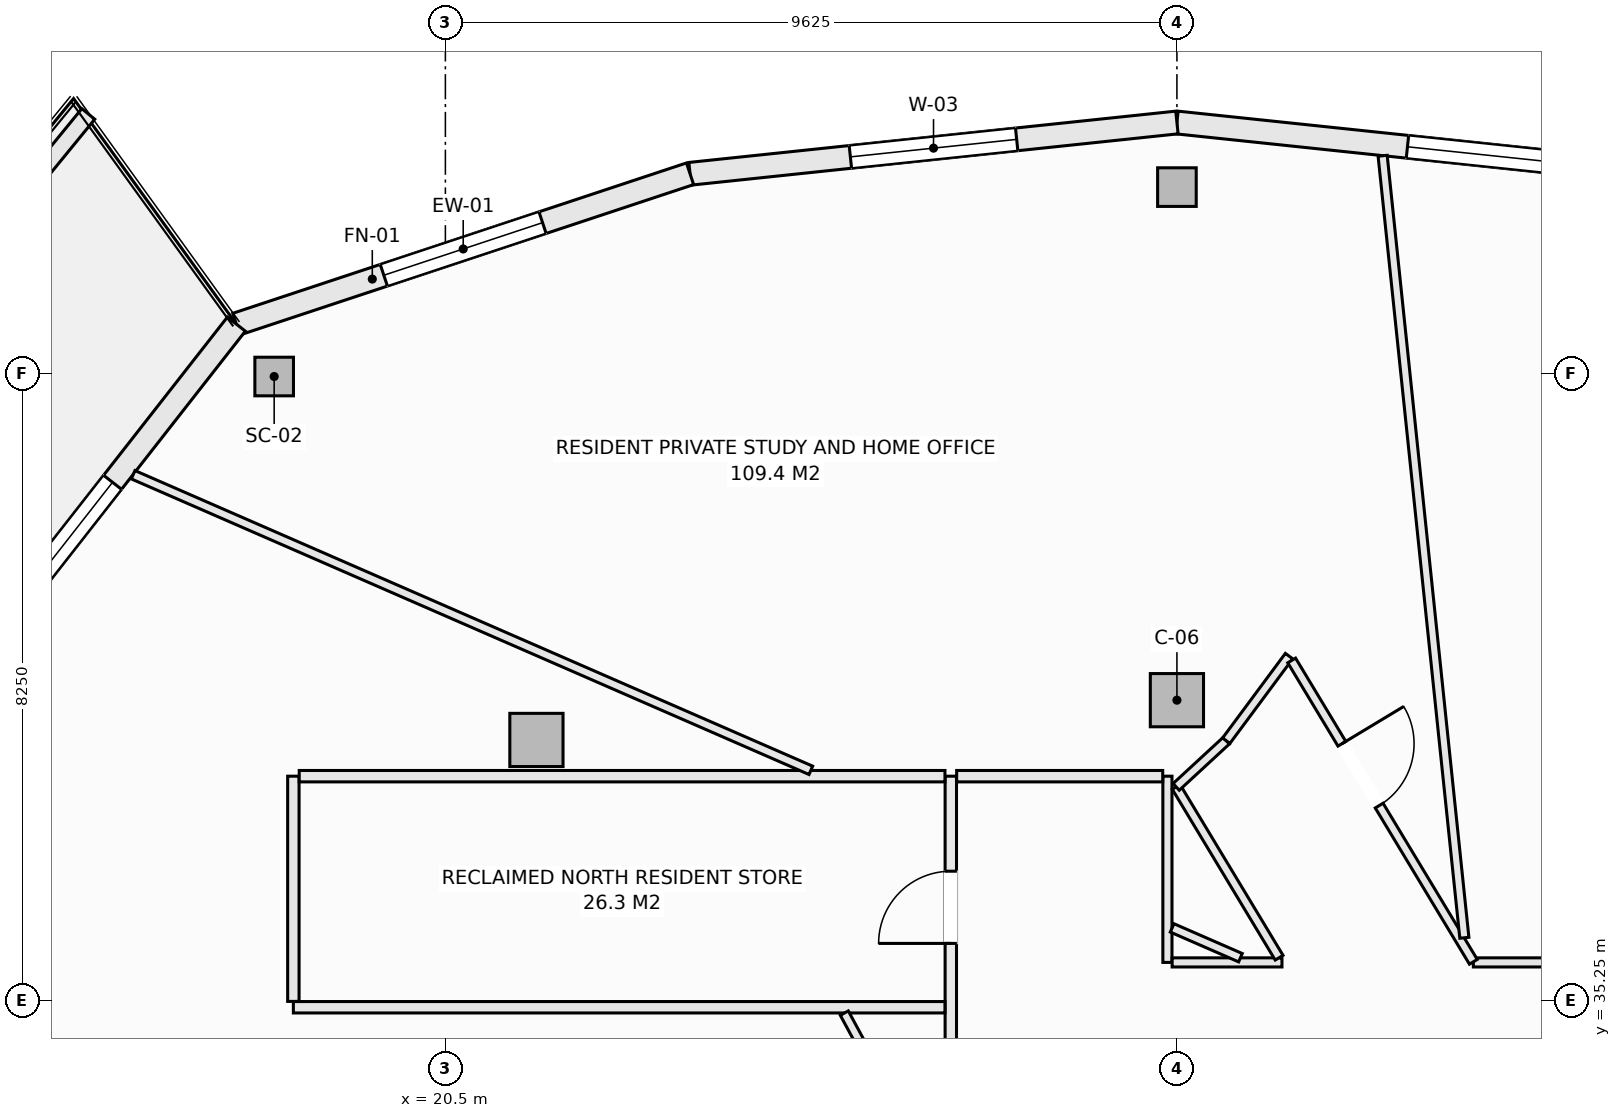
"""IFC4 building model, lengths in metres.
Left out: names, types, materials, properties, quantities, classifications, styles, units other than length and angle.
Written with IfcOpenShell. Run it as: python <this file> out.ifc"""

import sys

from ifc_helpers import new_model, si_unit, direction, frame, frame_2d, origin, origin_2d, place, context, subcontext, project, spatial, rectangle, hollow_rectangle, extrude, element, fill, save


model = new_model("IFC4")
c1 = context("Model", 3, precision=1e-05, world=origin(), true_north=direction((0.0, 1.0)))
c2 = subcontext(c1, "Body", "Model", "MODEL_VIEW")
j1 = project(units=[si_unit("LENGTHUNIT", "METRE"), si_unit("PLANEANGLEUNIT", "RADIAN")], contexts=[c1])
p1 = place(None, origin())
s1 = spatial("IfcSite", under=j1, at=p1, CompositionType="ELEMENT")
p2 = place(p1, origin())
s2 = spatial("IfcBuilding", under=s1, at=p2, CompositionType="ELEMENT")
p3 = place(p2, frame((0.0, 0.0, 232.7)))
s3 = spatial("IfcBuildingStorey", under=s2, at=p3, CompositionType="ELEMENT", Elevation=232.7)
for number, where, z_axis, x_axis in (
    (1, (30.125, 45.95, -0.27), (0.0, 0.0, 1.0), (1.0, 0.0, 0.0)),
    (2, (18.247, 43.458, -0.27), (0.0, 0.0, 1.0), (1.0, 0.0, 0.0)),
):
    element("IfcColumn", number, at=place(p3, frame(where, z_axis=z_axis, x_axis=x_axis)), inside=s3, PredefinedType="COLUMN", context=c2, shape_type="SweptSolid", body=[
        extrude(hollow_rectangle(XDim=0.508, YDim=0.508, WallThickness=0.019, at=origin_2d()), origin(), (0.0, 0.0, 1.0), 3.3),
    ])
for number, where, z_axis, x_axis in (
    (3, (30.125, 39.2, -0.27), (0.0, 0.0, 1.0), (1.0, 0.0, 0.0)),
    (4, (21.698, 38.677, -0.27), (0.0, 0.0, 1.0), (1.0, 0.0, 0.0)),
):
    element("IfcColumn", number, at=place(p3, frame(where, z_axis=z_axis, x_axis=x_axis)), inside=s3, PredefinedType="COLUMN", context=c2, shape_type="SweptSolid", body=[
        extrude(rectangle(XDim=0.7, YDim=0.7, at=origin_2d()), origin(), (0.0, 0.0, 1.0), 3.3),
    ])
p4 = place(p3, frame((30.125, 46.8, 0.0), z_axis=(0.0, 0.0, 1.0), x_axis=(0.994497142298, -0.104763705363, 0.0)))
e5 = element("IfcWall", 5, at=p4, inside=s3, PredefinedType="SOLIDWALL", context=c2, shape_type="SweptSolid", body=[
    extrude(rectangle(XDim=6.441, YDim=0.3, at=frame_2d((3.221, 0.0))), origin(), (0.0, 0.0, 1.0), 2.605),
])
p5 = place(p4, frame((3.05, 0.0, 0.72)))
e6 = element("IfcOpeningElement", 6, at=p5, cuts=e5, PredefinedType="OPENING", context=c2, shape_type="SweptSolid", body=[
    extrude(rectangle(XDim=2.2, YDim=1.65, at=frame_2d((1.1, 0.825))), frame((0.0, 0.16, 0.0), z_axis=(0.0, -1.0, 0.0), x_axis=(1.0, 0.0, 0.0)), (0.0, 0.0, 1.0), 0.32),
])
p6 = place(p3, frame((23.719, 46.125, 0.0), z_axis=(0.0, 0.0, 1.0), x_axis=(0.994497142298, 0.104763705363, 0.0)))
e7 = element("IfcWall", 7, at=p6, inside=s3, PredefinedType="SOLIDWALL", context=c2, shape_type="SweptSolid", body=[
    extrude(rectangle(XDim=6.441, YDim=0.3, at=frame_2d((3.221, 0.0))), origin(), (0.0, 0.0, 1.0), 2.605),
])
p7 = place(p6, frame((2.121, 0.0, 0.72)))
e8 = element("IfcOpeningElement", 8, at=p7, cuts=e7, PredefinedType="OPENING", context=c2, shape_type="SweptSolid", body=[
    extrude(rectangle(XDim=2.2, YDim=1.65, at=frame_2d((1.1, 0.825))), frame((0.0, 0.16, 0.0), z_axis=(0.0, -1.0, 0.0), x_axis=(1.0, 0.0, 0.0)), (0.0, 0.0, 1.0), 0.32),
])
p8 = place(p3, frame((17.75, 44.147, 0.0), z_axis=(0.0, 0.0, 1.0), x_axis=(0.949240877604, 0.314550085495, 0.0)))
e9 = element("IfcWall", 9, at=p8, inside=s3, PredefinedType="SOLIDWALL", context=c2, shape_type="SweptSolid", body=[
    extrude(rectangle(XDim=6.288, YDim=0.3, at=frame_2d((3.144, 0.0))), origin(), (0.0, 0.0, 1.0), 2.605),
])
p9 = place(p8, frame((2.044, 0.0, 0.72)))
e10 = element("IfcOpeningElement", 10, at=p9, cuts=e9, PredefinedType="OPENING", context=c2, shape_type="SweptSolid", body=[
    extrude(rectangle(XDim=2.2, YDim=1.65, at=frame_2d((1.1, 0.825))), frame((0.0, 0.16, 0.0), z_axis=(0.0, -1.0, 0.0), x_axis=(1.0, 0.0, 0.0)), (0.0, 0.0, 1.0), 0.32),
])
p10 = place(p3, frame((14.117, 39.507, 0.0), z_axis=(0.0, 0.0, 1.0), x_axis=(0.616450126935, 0.787393955401, 0.0)))
e11 = element("IfcWall", 11, at=p10, inside=s3, PredefinedType="SOLIDWALL", context=c2, shape_type="SweptSolid", body=[
    extrude(rectangle(XDim=5.893, YDim=0.3, at=frame_2d((2.946, 0.0))), origin(), (0.0, 0.0, 1.0), 2.605),
])
p11 = place(p10, frame((1.05, 0.0, 0.72)))
e12 = element("IfcOpeningElement", 12, at=p11, cuts=e11, PredefinedType="OPENING", context=c2, shape_type="SweptSolid", body=[
    extrude(rectangle(XDim=2.2, YDim=1.65, at=frame_2d((1.1, 0.825))), frame((0.0, 0.16, 0.0), z_axis=(0.0, -1.0, 0.0), x_axis=(1.0, 0.0, 0.0)), (0.0, 0.0, 1.0), 0.32),
])
p12 = place(p3, frame((11.427, 41.559, 0.0), z_axis=(0.0, 0.0, 1.0), x_axis=(0.632697312147, 0.774399193699, 0.0)))
e13 = element("IfcWall", 13, at=p12, inside=s3, PredefinedType="PARAPET", context=c2, shape_type="SweptSolid", body=[
    extrude(rectangle(XDim=6.914, YDim=0.22, at=frame_2d((3.457, 0.0))), origin(), (0.0, 0.0, 1.0), 0.52),
])
p13 = place(p3, frame((27.15, 34.002, 0.0), z_axis=(0.0, 0.0, 1.0), x_axis=(0.0, 1.0, 0.0)))
e14 = element("IfcWall", 14, at=p13, inside=s3, PredefinedType="PARTITIONING", context=c2, shape_type="SweptSolid", body=[
    extrude(rectangle(XDim=4.198, YDim=0.15, at=frame_2d((2.099, 0.0))), origin(), (0.0, 0.0, 1.0), 3.03),
])
p14 = place(p13, frame((1.998, 0.0, 0.0)))
e15 = element("IfcOpeningElement", 15, at=p14, cuts=e14, PredefinedType="OPENING", context=c2, shape_type="SweptSolid", body=[
    extrude(rectangle(XDim=0.95, YDim=2.1, at=frame_2d((0.475, 1.05))), frame((0.0, 0.085, 0.0), z_axis=(0.0, -1.0, 0.0), x_axis=(1.0, 0.0, 0.0)), (0.0, 0.0, 1.0), 0.17),
])
p15 = place(p3, frame((30.0, 35.75, 0.0), z_axis=(0.0, 0.0, 1.0), x_axis=(0.0, 1.0, 0.0)))
e16 = element("IfcWall", 16, at=p15, inside=s3, PredefinedType="PARTITIONING", context=c2, shape_type="SweptSolid", body=[
    extrude(rectangle(XDim=2.45, YDim=0.12, at=frame_2d((1.225, 0.0))), origin(), (0.0, 0.0, 1.0), 3.03),
])
p16 = place(p3, frame((18.5, 35.16, 0.0), z_axis=(0.0, 0.0, 1.0), x_axis=(1.0, 0.0, 0.0)))
e17 = element("IfcWall", 17, at=p16, inside=s3, PredefinedType="PARTITIONING", context=c2, shape_type="SweptSolid", body=[
    extrude(rectangle(XDim=8.573, YDim=0.15, at=frame_2d((4.287, 0.0))), origin(), (0.0, 0.0, 1.0), 3.03),
])
p17 = place(p3, frame((18.5, 35.237, 0.0), z_axis=(0.0, 0.0, 1.0), x_axis=(0.0, 1.0, 0.0)))
e18 = element("IfcWall", 18, at=p17, inside=s3, PredefinedType="PARTITIONING", context=c2, shape_type="SweptSolid", body=[
    extrude(rectangle(XDim=2.963, YDim=0.15, at=frame_2d((1.481, 0.0))), origin(), (0.0, 0.0, 1.0), 3.03),
])
p18 = place(p3, frame((18.577, 38.2, 0.0), z_axis=(0.0, 0.0, 1.0), x_axis=(1.0, 0.0, 0.0)))
e19 = element("IfcWall", 19, at=p18, inside=s3, PredefinedType="PARTITIONING", context=c2, shape_type="SweptSolid", body=[
    extrude(rectangle(XDim=8.496, YDim=0.15, at=frame_2d((4.248, 0.0))), origin(), (0.0, 0.0, 1.0), 3.03),
])
p19 = place(p3, frame((27.227, 38.2, 0.0), z_axis=(0.0, 0.0, 1.0), x_axis=(1.0, 0.0, 0.0)))
e20 = element("IfcWall", 20, at=p19, inside=s3, PredefinedType="PARTITIONING", context=c2, shape_type="SweptSolid", body=[
    extrude(rectangle(XDim=2.711, YDim=0.15, at=frame_2d((1.355, 0.0))), origin(), (0.0, 0.0, 1.0), 3.03),
])
p20 = place(p3, frame((30.062, 35.75, 0.0), z_axis=(0.0, 0.0, 1.0), x_axis=(1.0, 0.0, 0.0)))
e21 = element("IfcWall", 21, at=p20, inside=s3, PredefinedType="PARTITIONING", context=c2, shape_type="SweptSolid", body=[
    extrude(rectangle(XDim=1.445, YDim=0.12, at=frame_2d((0.723, 0.0))), origin(), (0.0, 0.0, 1.0), 3.03),
])
p21 = place(p3, frame((34.025, 35.75, 0.0), z_axis=(0.0, 0.0, 1.0), x_axis=(1.0, 0.0, 0.0)))
e22 = element("IfcWall", 22, at=p21, inside=s3, PredefinedType="PARTITIONING", context=c2, shape_type="SweptSolid", body=[
    extrude(rectangle(XDim=5.025, YDim=0.12, at=frame_2d((2.513, 0.0))), origin(), (0.0, 0.0, 1.0), 2.478),
])
p22 = place(p21, frame((1.617, 0.0, 0.0)))
e23 = element("IfcOpeningElement", 23, at=p22, cuts=e22, PredefinedType="OPENING", context=c2, shape_type="SweptSolid", body=[
    extrude(rectangle(XDim=0.95, YDim=2.1, at=frame_2d((0.475, 1.05))), frame((0.0, 0.07, 0.0), z_axis=(0.0, -1.0, 0.0), x_axis=(1.0, 0.0, 0.0)), (0.0, 0.0, 1.0), 0.14),
])
p23 = place(p3, frame((30.115, 38.059, 0.0), z_axis=(0.0, 0.0, 1.0), x_axis=(0.516246227887, -0.85644020935, 0.0)))
e24 = element("IfcWall", 24, at=p23, inside=s3, PredefinedType="PARTITIONING", context=c2, shape_type="SweptSolid", body=[
    extrude(rectangle(XDim=2.624, YDim=0.12, at=frame_2d((1.312, 0.0))), origin(), (0.0, 0.0, 1.0), 3.03),
])
p24 = place(p3, frame((30.115, 38.059, 0.0), z_axis=(0.0, 0.0, 1.0), x_axis=(0.734991343239, 0.678076489316, 0.0)))
e25 = element("IfcWall", 25, at=p24, inside=s3, PredefinedType="PARTITIONING", context=c2, shape_type="SweptSolid", body=[
    extrude(rectangle(XDim=0.896, YDim=0.12, at=frame_2d((0.448, 0.0))), origin(), (0.0, 0.0, 1.0), 3.03),
])
p25 = place(p3, frame((30.774, 38.667, 0.0), z_axis=(0.0, 0.0, 1.0), x_axis=(0.596019138224, 0.802970227885, 0.0)))
e26 = element("IfcWall", 26, at=p25, inside=s3, PredefinedType="PARTITIONING", context=c2, shape_type="SweptSolid", body=[
    extrude(rectangle(XDim=1.386, YDim=0.12, at=frame_2d((0.693, 0.0))), origin(), (0.0, 0.0, 1.0), 3.03),
])
p26 = place(p3, frame((31.635, 39.723, 0.0), z_axis=(0.0, 0.0, 1.0), x_axis=(0.516340331217, -0.856383478565, 0.0)))
e27 = element("IfcWall", 27, at=p26, inside=s3, PredefinedType="PARTITIONING", context=c2, shape_type="SweptSolid", body=[
    extrude(rectangle(XDim=4.629, YDim=0.12, at=frame_2d((2.315, 0.0))), origin(), (0.0, 0.0, 1.0), 3.03),
])
p27 = place(p26, frame((1.28, 0.0, 0.0)))
e28 = element("IfcOpeningElement", 28, at=p27, cuts=e27, PredefinedType="OPENING", context=c2, shape_type="SweptSolid", body=[
    extrude(rectangle(XDim=0.95, YDim=2.1, at=frame_2d((0.475, 1.05))), frame((0.0, 0.07, 0.0), z_axis=(0.0, -1.0, 0.0), x_axis=(1.0, 0.0, 0.0)), (0.0, 0.0, 1.0), 0.14),
])
p28 = place(p3, frame((16.392, 42.166, 0.0), z_axis=(0.0, 0.0, 1.0), x_axis=(0.916624998673, -0.399748185496, 0.0)))
e29 = element("IfcWall", 29, at=p28, inside=s3, PredefinedType="PARTITIONING", context=c2, shape_type="SweptSolid", body=[
    extrude(rectangle(XDim=9.728, YDim=0.12, at=frame_2d((4.864, 0.0))), origin(), (0.0, 0.0, 1.0), 2.478),
])
p29 = place(p3, frame((30.062, 36.204, 0.0), z_axis=(0.0, 0.0, 1.0), x_axis=(0.916602414635, -0.39979996684, 0.0)))
e30 = element("IfcWall", 30, at=p29, inside=s3, PredefinedType="PARTITIONING", context=c2, shape_type="SweptSolid", body=[
    extrude(rectangle(XDim=0.981, YDim=0.12, at=frame_2d((0.49, 0.0))), origin(), (0.0, 0.0, 1.0), 3.03),
])
p30 = place(p3, frame((32.832, 46.362, 0.0), z_axis=(0.0, 0.0, 1.0), x_axis=(0.103942686354, -0.994583288595, 0.0)))
e31 = element("IfcWall", 31, at=p30, inside=s3, PredefinedType="PARTITIONING", context=c2, shape_type="SweptSolid", body=[
    extrude(rectangle(XDim=10.344, YDim=0.12, at=frame_2d((5.172, 0.0))), origin(), (0.0, 0.0, 1.0), 2.77),
])
p31 = place(p3, frame((25.749, 35.083, 0.0), z_axis=(0.0, 0.0, 1.0), x_axis=(0.476052805352, -0.879416696746, 0.0)))
e32 = element("IfcWall", 32, at=p31, inside=s3, PredefinedType="PARTITIONING", context=c2, shape_type="SweptSolid", body=[
    extrude(rectangle(XDim=1.229, YDim=0.12, at=frame_2d((0.615, 0.0))), origin(), (0.0, 0.0, 1.0), 3.03),
])
p32 = place(p5, origin())
e33 = element("IfcWindow", 33, at=p32, inside=s3, PartitioningType="SINGLE_PANEL", PredefinedType="WINDOW", context=c2, shape_type="SweptSolid", body=[
    extrude(rectangle(XDim=2.2, YDim=1.65, at=frame_2d((1.1, 0.825))), frame((0.0, 0.03, 0.0), z_axis=(0.0, -1.0, 0.0), x_axis=(1.0, 0.0, 0.0)), (0.0, 0.0, 1.0), 0.06),
])
fill(e6, e33)
p33 = place(p7, origin())
e34 = element("IfcWindow", 34, at=p33, inside=s3, PartitioningType="SINGLE_PANEL", PredefinedType="WINDOW", context=c2, shape_type="SweptSolid", body=[
    extrude(rectangle(XDim=2.2, YDim=1.65, at=frame_2d((1.1, 0.825))), frame((0.0, 0.03, 0.0), z_axis=(0.0, -1.0, 0.0), x_axis=(1.0, 0.0, 0.0)), (0.0, 0.0, 1.0), 0.06),
])
fill(e8, e34)
p34 = place(p9, origin())
e35 = element("IfcWindow", 35, at=p34, inside=s3, PartitioningType="SINGLE_PANEL", PredefinedType="WINDOW", context=c2, shape_type="SweptSolid", body=[
    extrude(rectangle(XDim=2.2, YDim=1.65, at=frame_2d((1.1, 0.825))), frame((0.0, 0.03, 0.0), z_axis=(0.0, -1.0, 0.0), x_axis=(1.0, 0.0, 0.0)), (0.0, 0.0, 1.0), 0.06),
])
fill(e10, e35)
p35 = place(p11, origin())
e36 = element("IfcWindow", 36, at=p35, inside=s3, PartitioningType="SINGLE_PANEL", PredefinedType="WINDOW", context=c2, shape_type="SweptSolid", body=[
    extrude(rectangle(XDim=2.2, YDim=1.65, at=frame_2d((1.1, 0.825))), frame((0.0, 0.03, 0.0), z_axis=(0.0, -1.0, 0.0), x_axis=(1.0, 0.0, 0.0)), (0.0, 0.0, 1.0), 0.06),
])
fill(e12, e36)
p36 = place(p14, origin())
e37 = element("IfcDoor", 37, at=p36, inside=s3, OperationType="SINGLE_SWING_LEFT", PredefinedType="DOOR", context=c2, shape_type="SweptSolid", body=[
    extrude(rectangle(XDim=0.95, YDim=2.1, at=frame_2d((0.475, 1.05))), frame((0.0, 0.025, 0.0), z_axis=(0.0, -1.0, 0.0), x_axis=(1.0, 0.0, 0.0)), (0.0, 0.0, 1.0), 0.05),
])
fill(e15, e37)
p37 = place(p27, origin())
e38 = element("IfcDoor", 38, at=p37, inside=s3, OperationType="SINGLE_SWING_LEFT", PredefinedType="DOOR", context=c2, shape_type="SweptSolid", body=[
    extrude(rectangle(XDim=0.95, YDim=2.1, at=frame_2d((0.475, 1.05))), frame((0.0, 0.025, 0.0), z_axis=(0.0, -1.0, 0.0), x_axis=(1.0, 0.0, 0.0)), (0.0, 0.0, 1.0), 0.05),
])
fill(e28, e38)
save(model, sys.argv[1])
